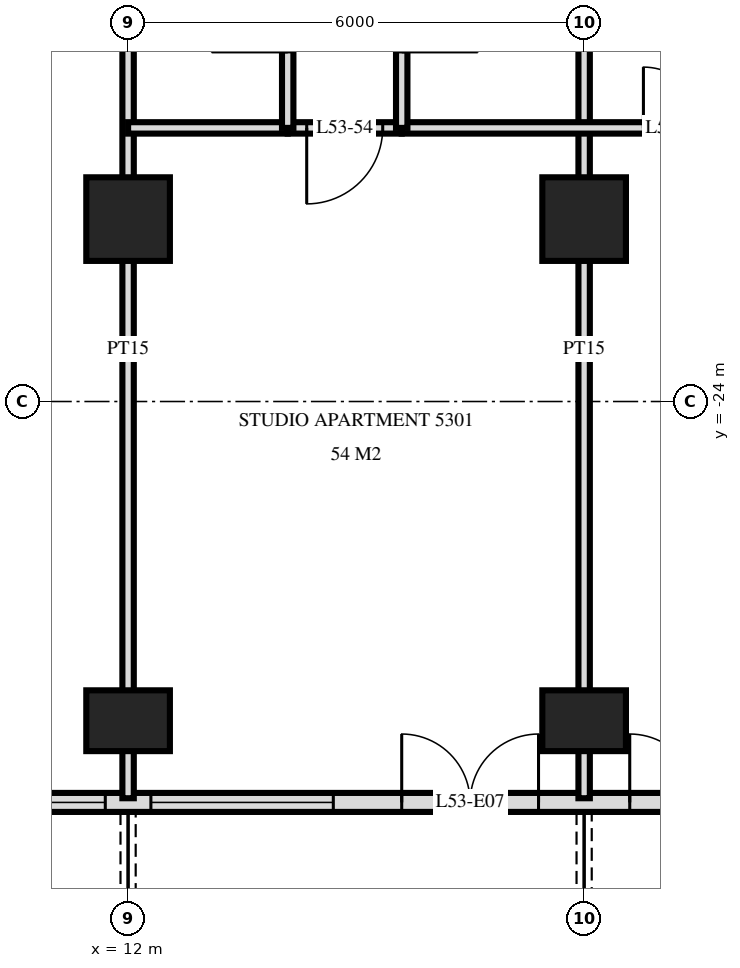
"""IFC4 building model, lengths in metres.
Left out: names, types, materials, properties, quantities, classifications, styles, units other than length and angle.
Written with IfcOpenShell. Run it as: python <this file> out.ifc"""

import sys

from ifc_helpers import new_model, si_unit, direction, frame, frame_2d, origin, origin_2d, place, context, subcontext, project, spatial, rectangle, extrude, element, fill, save


model = new_model("IFC4")
c1 = context("Model", 3, precision=1e-05, world=origin(), true_north=direction((0.0, 1.0)))
c2 = subcontext(c1, "Body", "Model", "MODEL_VIEW")
j1 = project(units=[si_unit("LENGTHUNIT", "METRE"), si_unit("PLANEANGLEUNIT", "RADIAN")], contexts=[c1])
p1 = place(None, origin())
s1 = spatial("IfcSite", under=j1, at=p1, CompositionType="ELEMENT")
p2 = place(p1, origin())
s2 = spatial("IfcBuilding", under=s1, at=p2, CompositionType="ELEMENT")
p3 = place(p2, frame((0.0, 0.0, 204.6)))
s3 = spatial("IfcBuildingStorey", under=s2, at=p3, CompositionType="ELEMENT", Elevation=204.6)
p4 = place(p3, frame((12.0, -28.2, 0.0), z_axis=(0.0, 0.0, 1.0), x_axis=(1.0, 0.0, 0.0)))
e1 = element("IfcColumn", 1, at=p4, inside=s3, PredefinedType="COLUMN", context=c2, shape_type="SweptSolid", body=[
    extrude(rectangle(XDim=1.1, YDim=0.8, at=origin_2d()), origin(), (0.0, 0.0, 1.0), 3.5),
])
p5 = place(p3, frame((12.0, -21.6, 0.0), z_axis=(0.0, 0.0, 1.0), x_axis=(1.0, 0.0, 0.0)))
e2 = element("IfcColumn", 2, at=p5, inside=s3, PredefinedType="COLUMN", context=c2, shape_type="SweptSolid", body=[
    extrude(rectangle(XDim=1.1, YDim=1.1, at=origin_2d()), origin(), (0.0, 0.0, 1.0), 3.5),
])
p6 = place(p3, frame((18.0, -28.2, 0.0), z_axis=(0.0, 0.0, 1.0), x_axis=(1.0, 0.0, 0.0)))
e3 = element("IfcColumn", 3, at=p6, inside=s3, PredefinedType="COLUMN", context=c2, shape_type="SweptSolid", body=[
    extrude(rectangle(XDim=1.1, YDim=0.8, at=origin_2d()), origin(), (0.0, 0.0, 1.0), 3.5),
])
p7 = place(p3, frame((18.0, -21.6, 0.0), z_axis=(0.0, 0.0, 1.0), x_axis=(1.0, 0.0, 0.0)))
e4 = element("IfcColumn", 4, at=p7, inside=s3, PredefinedType="COLUMN", context=c2, shape_type="SweptSolid", body=[
    extrude(rectangle(XDim=1.1, YDim=1.1, at=origin_2d()), origin(), (0.0, 0.0, 1.0), 3.5),
])
p8 = place(p3, frame((-22.475, -29.275, 0.0), z_axis=(0.0, 0.0, 1.0), x_axis=(1.0, 0.0, 0.0)))
e5 = element("IfcWall", 5, at=p8, inside=s3, PredefinedType="SOLIDWALL", context=c2, shape_type="SweptSolid", body=[
    extrude(rectangle(XDim=44.951, YDim=0.25, at=frame_2d((22.475, 0.0))), origin(), (0.0, 0.0, 1.0), 3.22),
])
p9 = place(p8, frame((0.575, 0.0, 0.0)))
e6 = element("IfcOpeningElement", 6, at=p9, cuts=e5, PredefinedType="OPENING", context=c2, shape_type="SweptSolid", body=[
    extrude(rectangle(XDim=1.8, YDim=2.4, at=frame_2d((0.9, 1.2))), frame((0.0, 0.135, 0.0), z_axis=(0.0, -1.0, 0.0), x_axis=(1.0, 0.0, 0.0)), (0.0, 0.0, 1.0), 0.27),
])
p10 = place(p8, frame((6.2, 0.0, 0.0)))
e7 = element("IfcOpeningElement", 7, at=p10, cuts=e5, PredefinedType="OPENING", context=c2, shape_type="SweptSolid", body=[
    extrude(rectangle(XDim=1.8, YDim=2.4, at=frame_2d((0.9, 1.2))), frame((0.0, 0.135, 0.0), z_axis=(0.0, -1.0, 0.0), x_axis=(1.0, 0.0, 0.0)), (0.0, 0.0, 1.0), 0.27),
])
p11 = place(p8, frame((8.45, 0.0, 0.9)))
e8 = element("IfcOpeningElement", 8, at=p11, cuts=e5, PredefinedType="OPENING", context=c2, shape_type="SweptSolid", body=[
    extrude(rectangle(XDim=1.8, YDim=1.5, at=frame_2d((0.9, 0.75))), frame((0.0, 0.135, 0.0), z_axis=(0.0, -1.0, 0.0), x_axis=(1.0, 0.0, 0.0)), (0.0, 0.0, 1.0), 0.27),
])
p12 = place(p8, frame((11.075, 0.0, 0.0)))
e9 = element("IfcOpeningElement", 9, at=p12, cuts=e5, PredefinedType="OPENING", context=c2, shape_type="SweptSolid", body=[
    extrude(rectangle(XDim=1.8, YDim=2.4, at=frame_2d((0.9, 1.2))), frame((0.0, 0.135, 0.0), z_axis=(0.0, -1.0, 0.0), x_axis=(1.0, 0.0, 0.0)), (0.0, 0.0, 1.0), 0.27),
])
p13 = place(p8, frame((13.775, 0.0, 0.9)))
e10 = element("IfcOpeningElement", 10, at=p13, cuts=e5, PredefinedType="OPENING", context=c2, shape_type="SweptSolid", body=[
    extrude(rectangle(XDim=2.4, YDim=1.5, at=frame_2d((1.2, 0.75))), frame((0.0, 0.135, 0.0), z_axis=(0.0, -1.0, 0.0), x_axis=(1.0, 0.0, 0.0)), (0.0, 0.0, 1.0), 0.27),
])
p14 = place(p8, frame((16.775, 0.0, 0.9)))
e11 = element("IfcOpeningElement", 11, at=p14, cuts=e5, PredefinedType="OPENING", context=c2, shape_type="SweptSolid", body=[
    extrude(rectangle(XDim=2.4, YDim=1.5, at=frame_2d((1.2, 0.75))), frame((0.0, 0.135, 0.0), z_axis=(0.0, -1.0, 0.0), x_axis=(1.0, 0.0, 0.0)), (0.0, 0.0, 1.0), 0.27),
])
p15 = place(p8, frame((20.075, 0.0, 0.0)))
e12 = element("IfcOpeningElement", 12, at=p15, cuts=e5, PredefinedType="OPENING", context=c2, shape_type="SweptSolid", body=[
    extrude(rectangle(XDim=1.8, YDim=2.4, at=frame_2d((0.9, 1.2))), frame((0.0, 0.135, 0.0), z_axis=(0.0, -1.0, 0.0), x_axis=(1.0, 0.0, 0.0)), (0.0, 0.0, 1.0), 0.27),
])
p16 = place(p8, frame((23.075, 0.0, 0.0)))
e13 = element("IfcOpeningElement", 13, at=p16, cuts=e5, PredefinedType="OPENING", context=c2, shape_type="SweptSolid", body=[
    extrude(rectangle(XDim=1.8, YDim=2.4, at=frame_2d((0.9, 1.2))), frame((0.0, 0.135, 0.0), z_axis=(0.0, -1.0, 0.0), x_axis=(1.0, 0.0, 0.0)), (0.0, 0.0, 1.0), 0.27),
])
p17 = place(p8, frame((25.775, 0.0, 0.9)))
e14 = element("IfcOpeningElement", 14, at=p17, cuts=e5, PredefinedType="OPENING", context=c2, shape_type="SweptSolid", body=[
    extrude(rectangle(XDim=2.4, YDim=1.5, at=frame_2d((1.2, 0.75))), frame((0.0, 0.135, 0.0), z_axis=(0.0, -1.0, 0.0), x_axis=(1.0, 0.0, 0.0)), (0.0, 0.0, 1.0), 0.27),
])
p18 = place(p8, frame((29.075, 0.0, 0.0)))
e15 = element("IfcOpeningElement", 15, at=p18, cuts=e5, PredefinedType="OPENING", context=c2, shape_type="SweptSolid", body=[
    extrude(rectangle(XDim=1.8, YDim=2.4, at=frame_2d((0.9, 1.2))), frame((0.0, 0.135, 0.0), z_axis=(0.0, -1.0, 0.0), x_axis=(1.0, 0.0, 0.0)), (0.0, 0.0, 1.0), 0.27),
])
p19 = place(p8, frame((31.775, 0.0, 0.9)))
e16 = element("IfcOpeningElement", 16, at=p19, cuts=e5, PredefinedType="OPENING", context=c2, shape_type="SweptSolid", body=[
    extrude(rectangle(XDim=2.4, YDim=1.5, at=frame_2d((1.2, 0.75))), frame((0.0, 0.135, 0.0), z_axis=(0.0, -1.0, 0.0), x_axis=(1.0, 0.0, 0.0)), (0.0, 0.0, 1.0), 0.27),
])
p20 = place(p8, frame((34.775, 0.0, 0.9)))
e17 = element("IfcOpeningElement", 17, at=p20, cuts=e5, PredefinedType="OPENING", context=c2, shape_type="SweptSolid", body=[
    extrude(rectangle(XDim=2.4, YDim=1.5, at=frame_2d((1.2, 0.75))), frame((0.0, 0.135, 0.0), z_axis=(0.0, -1.0, 0.0), x_axis=(1.0, 0.0, 0.0)), (0.0, 0.0, 1.0), 0.27),
])
p21 = place(p8, frame((38.075, 0.0, 0.0)))
e18 = element("IfcOpeningElement", 18, at=p21, cuts=e5, PredefinedType="OPENING", context=c2, shape_type="SweptSolid", body=[
    extrude(rectangle(XDim=1.8, YDim=2.4, at=frame_2d((0.9, 1.2))), frame((0.0, 0.135, 0.0), z_axis=(0.0, -1.0, 0.0), x_axis=(1.0, 0.0, 0.0)), (0.0, 0.0, 1.0), 0.27),
])
p22 = place(p8, frame((41.075, 0.0, 0.0)))
e19 = element("IfcOpeningElement", 19, at=p22, cuts=e5, PredefinedType="OPENING", context=c2, shape_type="SweptSolid", body=[
    extrude(rectangle(XDim=1.8, YDim=2.4, at=frame_2d((0.9, 1.2))), frame((0.0, 0.135, 0.0), z_axis=(0.0, -1.0, 0.0), x_axis=(1.0, 0.0, 0.0)), (0.0, 0.0, 1.0), 0.27),
])
p23 = place(p3, frame((18.0, -29.22, 0.0), z_axis=(0.0, 0.0, 1.0), x_axis=(0.0, 1.0, 0.0)))
e20 = element("IfcWall", 20, at=p23, inside=s3, PredefinedType="PARTITIONING", context=c2, shape_type="SweptSolid", body=[
    extrude(rectangle(XDim=11.82, YDim=0.15, at=frame_2d((5.91, 0.0))), origin(), (0.0, 0.0, 1.0), 3.22),
])
p24 = place(p3, frame((15.6, -20.4, 0.0), z_axis=(0.0, 0.0, 1.0), x_axis=(0.0, 1.0, 0.0)))
e21 = element("IfcWall", 21, at=p24, inside=s3, PredefinedType="PARTITIONING", context=c2, shape_type="SweptSolid", body=[
    extrude(rectangle(XDim=3.0, YDim=0.15, at=frame_2d((1.5, 0.0))), origin(), (0.0, 0.0, 1.0), 3.22),
])
p25 = place(p24, frame((1.0, 0.0, 0.0)))
e22 = element("IfcOpeningElement", 22, at=p25, cuts=e21, PredefinedType="OPENING", context=c2, shape_type="SweptSolid", body=[
    extrude(rectangle(XDim=1.0, YDim=2.1, at=frame_2d((0.5, 1.05))), frame((0.0, 0.085, 0.0), z_axis=(0.0, -1.0, 0.0), x_axis=(1.0, 0.0, 0.0)), (0.0, 0.0, 1.0), 0.17),
])
p26 = place(p3, frame((14.1, -20.4, 0.0), z_axis=(0.0, 0.0, 1.0), x_axis=(0.0, 1.0, 0.0)))
e23 = element("IfcWall", 23, at=p26, inside=s3, PredefinedType="PARTITIONING", context=c2, shape_type="SweptSolid", body=[
    extrude(rectangle(XDim=3.0, YDim=0.15, at=frame_2d((1.5, 0.0))), origin(), (0.0, 0.0, 1.0), 3.22),
])
p27 = place(p26, frame((1.0, 0.0, 0.0)))
e24 = element("IfcOpeningElement", 24, at=p27, cuts=e23, PredefinedType="OPENING", context=c2, shape_type="SweptSolid", body=[
    extrude(rectangle(XDim=1.0, YDim=2.1, at=frame_2d((0.5, 1.05))), frame((0.0, 0.085, 0.0), z_axis=(0.0, -1.0, 0.0), x_axis=(1.0, 0.0, 0.0)), (0.0, 0.0, 1.0), 0.17),
])
p28 = place(p3, frame((12.0, -29.22, 0.0), z_axis=(0.0, 0.0, 1.0), x_axis=(0.0, 1.0, 0.0)))
e25 = element("IfcWall", 25, at=p28, inside=s3, PredefinedType="PARTITIONING", context=c2, shape_type="SweptSolid", body=[
    extrude(rectangle(XDim=11.82, YDim=0.15, at=frame_2d((5.91, 0.0))), origin(), (0.0, 0.0, 1.0), 3.22),
])
p29 = place(p3, frame((14.1, -20.4, 0.0), z_axis=(0.0, 0.0, 1.0), x_axis=(1.0, 0.0, 0.0)))
e26 = element("IfcWall", 26, at=p29, inside=s3, PredefinedType="PARTITIONING", context=c2, shape_type="SweptSolid", body=[
    extrude(rectangle(XDim=1.5, YDim=0.15, at=frame_2d((0.75, 0.0))), origin(), (0.0, 0.0, 1.0), 3.22),
])
p30 = place(p29, frame((0.25, 0.0, 0.0)))
e27 = element("IfcOpeningElement", 27, at=p30, cuts=e26, PredefinedType="OPENING", context=c2, shape_type="SweptSolid", body=[
    extrude(rectangle(XDim=1.0, YDim=2.1, at=frame_2d((0.5, 1.05))), frame((0.0, 0.085, 0.0), z_axis=(0.0, -1.0, 0.0), x_axis=(1.0, 0.0, 0.0)), (0.0, 0.0, 1.0), 0.17),
])
p31 = place(p3, frame((12.0, -20.4, 0.0), z_axis=(0.0, 0.0, 1.0), x_axis=(1.0, 0.0, 0.0)))
e28 = element("IfcWall", 28, at=p31, inside=s3, PredefinedType="PARTITIONING", context=c2, shape_type="SweptSolid", body=[
    extrude(rectangle(XDim=2.1, YDim=0.15, at=frame_2d((1.05, 0.0))), origin(), (0.0, 0.0, 1.0), 3.22),
])
p32 = place(p3, frame((15.6, -20.4, 0.0), z_axis=(0.0, 0.0, 1.0), x_axis=(1.0, 0.0, 0.0)))
e29 = element("IfcWall", 29, at=p32, inside=s3, PredefinedType="PARTITIONING", context=c2, shape_type="SweptSolid", body=[
    extrude(rectangle(XDim=6.6, YDim=0.15, at=frame_2d((3.3, 0.0))), origin(), (0.0, 0.0, 1.0), 3.22),
])
p33 = place(p32, frame((3.18, 0.0, 0.0)))
e30 = element("IfcOpeningElement", 30, at=p33, cuts=e29, PredefinedType="OPENING", context=c2, shape_type="SweptSolid", body=[
    extrude(rectangle(XDim=0.8, YDim=2.1, at=frame_2d((0.4, 1.05))), frame((0.0, 0.085, 0.0), z_axis=(0.0, -1.0, 0.0), x_axis=(1.0, 0.0, 0.0)), (0.0, 0.0, 1.0), 0.17),
])
p34 = place(p19, origin())
e31 = element("IfcWindow", 31, at=p34, inside=s3, PartitioningType="SINGLE_PANEL", PredefinedType="WINDOW", context=c2, shape_type="SweptSolid", body=[
    extrude(rectangle(XDim=2.4, YDim=1.5, at=frame_2d((1.2, 0.75))), frame((0.0, 0.03, 0.0), z_axis=(0.0, -1.0, 0.0), x_axis=(1.0, 0.0, 0.0)), (0.0, 0.0, 1.0), 0.06),
])
fill(e16, e31)
p35 = place(p20, origin())
e32 = element("IfcWindow", 32, at=p35, inside=s3, PartitioningType="SINGLE_PANEL", PredefinedType="WINDOW", context=c2, shape_type="SweptSolid", body=[
    extrude(rectangle(XDim=2.4, YDim=1.5, at=frame_2d((1.2, 0.75))), frame((0.0, 0.03, 0.0), z_axis=(0.0, -1.0, 0.0), x_axis=(1.0, 0.0, 0.0)), (0.0, 0.0, 1.0), 0.06),
])
fill(e17, e32)
p36 = place(p21, origin())
e33 = element("IfcDoor", 33, at=p36, inside=s3, OperationType="DOUBLE_DOOR_SINGLE_SWING", PredefinedType="DOOR", context=c2, shape_type="SweptSolid", body=[
    extrude(rectangle(XDim=1.8, YDim=2.4, at=frame_2d((0.9, 1.2))), frame((0.0, 0.025, 0.0), z_axis=(0.0, -1.0, 0.0), x_axis=(1.0, 0.0, 0.0)), (0.0, 0.0, 1.0), 0.05),
])
fill(e18, e33)
p37 = place(p22, origin())
e34 = element("IfcDoor", 34, at=p37, inside=s3, OperationType="DOUBLE_DOOR_SINGLE_SWING", PredefinedType="DOOR", context=c2, shape_type="SweptSolid", body=[
    extrude(rectangle(XDim=1.8, YDim=2.4, at=frame_2d((0.9, 1.2))), frame((0.0, 0.025, 0.0), z_axis=(0.0, -1.0, 0.0), x_axis=(1.0, 0.0, 0.0)), (0.0, 0.0, 1.0), 0.05),
])
fill(e19, e34)
p38 = place(p30, frame((0.5, 0.0, 0.0), z_axis=(0.0, 0.0, 1.0), x_axis=(-1.0, 0.0, 0.0)))
e35 = element("IfcDoor", 35, at=p38, inside=s3, OperationType="SINGLE_SWING_LEFT", PredefinedType="DOOR", context=c2, shape_type="SweptSolid", body=[
    extrude(rectangle(XDim=1.0, YDim=2.1, at=frame_2d((0.0, 1.05))), frame((0.0, -0.025, 0.0), z_axis=(0.0, 1.0, 0.0), x_axis=(-1.0, 0.0, 0.0)), (0.0, 0.0, 1.0), 0.05),
])
fill(e27, e35)
p39 = place(p33, origin())
e36 = element("IfcDoor", 36, at=p39, inside=s3, OperationType="SINGLE_SWING_RIGHT", PredefinedType="DOOR", context=c2, shape_type="SweptSolid", body=[
    extrude(rectangle(XDim=0.8, YDim=2.1, at=frame_2d((0.4, 1.05))), frame((0.0, 0.025, 0.0), z_axis=(0.0, -1.0, 0.0), x_axis=(1.0, 0.0, 0.0)), (0.0, 0.0, 1.0), 0.05),
])
fill(e30, e36)
save(model, sys.argv[1])
